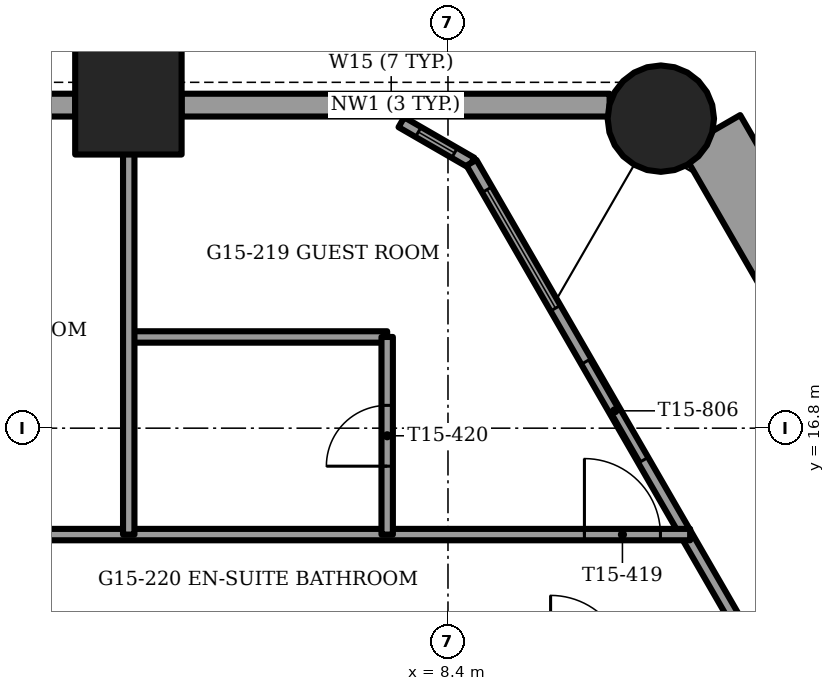
"""IFC4 building model, lengths in metres.
Left out: names, types, materials, properties, quantities, classifications, styles, units other than length and angle.
Written with IfcOpenShell. Run it as: python <this file> out.ifc"""

import sys

from ifc_helpers import new_model, si_unit, direction, frame, frame_2d, origin, origin_2d, place, context, subcontext, project, spatial, rectangle, circle, extrude, element, fill, save


model = new_model("IFC4")
c1 = context("Model", 3, precision=1e-05, world=origin(), true_north=direction((0.0, 1.0)))
c2 = subcontext(c1, "Body", "Model", "MODEL_VIEW")
j1 = project(units=[si_unit("LENGTHUNIT", "METRE"), si_unit("PLANEANGLEUNIT", "RADIAN")], contexts=[c1])
p1 = place(None, origin())
s1 = spatial("IfcSite", under=j1, at=p1, CompositionType="ELEMENT")
p2 = place(p1, origin())
s2 = spatial("IfcBuilding", under=s1, at=p2, CompositionType="ELEMENT")
p3 = place(p2, frame((0.0, 0.0, 61.75)))
s3 = spatial("IfcBuildingStorey", under=s2, at=p3, CompositionType="ELEMENT", Elevation=61.75)
p4 = place(p3, frame((11.2, 20.872, -1.2), z_axis=(0.0, 0.0, 1.0), x_axis=(1.0, 0.0, 0.0)))
e1 = element("IfcColumn", 1, at=p4, inside=s3, PredefinedType="COLUMN", context=c2, shape_type="SweptSolid", body=[
    extrude(circle(Radius=0.7, at=origin_2d()), origin(), (0.0, 0.0, 1.0), 3.75),
])
p5 = place(p3, frame((4.195, 21.1, -1.2), z_axis=(0.0, 0.0, 1.0), x_axis=(1.0, 0.0, 0.0)))
e2 = element("IfcColumn", 2, at=p5, inside=s3, PredefinedType="COLUMN", context=c2, shape_type="SweptSolid", body=[
    extrude(rectangle(XDim=1.4, YDim=1.4, at=origin_2d()), origin(), (0.0, 0.0, 1.0), 3.75),
])
p6 = place(p3, frame((15.419, 14.521, 0.0), z_axis=(0.0, 0.0, 1.0), x_axis=(-0.500013966327, 0.866017340172, 0.0)))
e3 = element("IfcWall", 3, at=p6, inside=s3, PredefinedType="PARAPET", context=c2, shape_type="SweptSolid", body=[
    extrude(rectangle(XDim=7.129, YDim=0.9, at=frame_2d((3.564, 0.0))), origin(), (0.0, 0.0, 1.0), 1.1),
])
p7 = place(p3, frame((10.526, 21.05, 0.0), z_axis=(0.0, 0.0, 1.0), x_axis=(-1.0, 0.0, 0.0)))
e4 = element("IfcWall", 4, at=p7, inside=s3, PredefinedType="SOLIDWALL", context=c2, shape_type="SweptSolid", body=[
    extrude(rectangle(XDim=5.631, YDim=0.3, at=frame_2d((2.815, 0.0))), origin(), (0.0, 0.0, 1.0), 2.55),
])
p8 = place(p7, frame((2.423, 0.0, 0.15)))
e5 = element("IfcOpeningElement", 5, at=p8, cuts=e4, PredefinedType="OPENING", context=c2, shape_type="SweptSolid", body=[
    extrude(rectangle(XDim=0.9, YDim=2.15, at=frame_2d((0.45, 1.075))), frame((0.0, 0.15, 0.0), z_axis=(0.0, -1.0, 0.0), x_axis=(1.0, 0.0, 0.0)), (0.0, 0.0, 1.0), 0.3),
])
p9 = place(p3, frame((3.495, 21.05, 0.0), z_axis=(0.0, 0.0, 1.0), x_axis=(-1.0, 0.0, 0.0)))
e6 = element("IfcWall", 6, at=p9, inside=s3, PredefinedType="SOLIDWALL", context=c2, shape_type="SweptSolid", body=[
    extrude(rectangle(XDim=6.991, YDim=0.3, at=frame_2d((3.495, 0.0))), origin(), (0.0, 0.0, 1.0), 2.55),
])
p10 = place(p9, frame((0.8, 0.0, 0.15)))
e7 = element("IfcOpeningElement", 7, at=p10, cuts=e6, PredefinedType="OPENING", context=c2, shape_type="SweptSolid", body=[
    extrude(rectangle(XDim=1.8, YDim=2.15, at=frame_2d((0.9, 1.075))), frame((0.0, 0.15, 0.0), z_axis=(0.0, -1.0, 0.0), x_axis=(1.0, 0.0, 0.0)), (0.0, 0.0, 1.0), 0.3),
])
p11 = place(p9, frame((4.295, 0.0, 0.15)))
e8 = element("IfcOpeningElement", 8, at=p11, cuts=e6, PredefinedType="OPENING", context=c2, shape_type="SweptSolid", body=[
    extrude(rectangle(XDim=1.8, YDim=2.15, at=frame_2d((0.9, 1.075))), frame((0.0, 0.15, 0.0), z_axis=(0.0, -1.0, 0.0), x_axis=(1.0, 0.0, 0.0)), (0.0, 0.0, 1.0), 0.3),
])
p12 = place(p3, frame((20.543, -0.204, 0.0), z_axis=(0.0, 0.0, 1.0), x_axis=(-0.500005515081, 0.866022219628, 0.0)))
e9 = element("IfcWall", 9, at=p12, inside=s3, PredefinedType="SOLIDWALL", context=c2, shape_type="SweptSolid", body=[
    extrude(rectangle(XDim=23.667, YDim=0.15, at=frame_2d((11.833, 0.0))), origin(), (0.0, 0.0, 1.0), 3.45),
])
p13 = place(p12, frame((6.548, 0.0, 0.15)))
e10 = element("IfcOpeningElement", 10, at=p13, cuts=e9, PredefinedType="OPENING", context=c2, shape_type="SweptSolid", body=[
    extrude(rectangle(XDim=1.5, YDim=2.85, at=frame_2d((0.75, 1.425))), frame((0.0, 0.075, 0.0), z_axis=(0.0, -1.0, 0.0), x_axis=(1.0, 0.0, 0.0)), (0.0, 0.0, 1.0), 0.15),
])
p14 = place(p12, frame((8.648, 0.0, 0.15)))
e11 = element("IfcOpeningElement", 11, at=p14, cuts=e9, PredefinedType="OPENING", context=c2, shape_type="SweptSolid", body=[
    extrude(rectangle(XDim=1.8, YDim=2.85, at=frame_2d((0.9, 1.425))), frame((0.0, 0.075, 0.0), z_axis=(0.0, -1.0, 0.0), x_axis=(1.0, 0.0, 0.0)), (0.0, 0.0, 1.0), 0.15),
])
p15 = place(p12, frame((10.748, 0.0, 0.15)))
e12 = element("IfcOpeningElement", 12, at=p15, cuts=e9, PredefinedType="OPENING", context=c2, shape_type="SweptSolid", body=[
    extrude(rectangle(XDim=1.5, YDim=2.85, at=frame_2d((0.75, 1.425))), frame((0.0, 0.075, 0.0), z_axis=(0.0, -1.0, 0.0), x_axis=(1.0, 0.0, 0.0)), (0.0, 0.0, 1.0), 0.15),
])
p16 = place(p12, frame((13.914, 0.0, 0.15)))
e13 = element("IfcOpeningElement", 13, at=p16, cuts=e9, PredefinedType="OPENING", context=c2, shape_type="SweptSolid", body=[
    extrude(rectangle(XDim=0.9, YDim=2.85, at=frame_2d((0.45, 1.425))), frame((0.0, 0.075, 0.0), z_axis=(0.0, -1.0, 0.0), x_axis=(1.0, 0.0, 0.0)), (0.0, 0.0, 1.0), 0.15),
])
p17 = place(p12, frame((14.948, 0.0, 0.15)))
e14 = element("IfcOpeningElement", 14, at=p17, cuts=e9, PredefinedType="OPENING", context=c2, shape_type="SweptSolid", body=[
    extrude(rectangle(XDim=1.5, YDim=2.85, at=frame_2d((0.75, 1.425))), frame((0.0, 0.075, 0.0), z_axis=(0.0, -1.0, 0.0), x_axis=(1.0, 0.0, 0.0)), (0.0, 0.0, 1.0), 0.15),
])
p18 = place(p12, frame((19.148, 0.0, 0.0)))
e15 = element("IfcOpeningElement", 15, at=p18, cuts=e9, PredefinedType="OPENING", context=c2, shape_type="SweptSolid", body=[
    extrude(rectangle(XDim=1.5, YDim=2.4, at=frame_2d((0.75, 1.2))), frame((0.0, 0.075, 0.0), z_axis=(0.0, -1.0, 0.0), x_axis=(1.0, 0.0, 0.0)), (0.0, 0.0, 1.0), 0.15),
])
p19 = place(p12, frame((1.617, 0.0, 0.15)))
e16 = element("IfcOpeningElement", 16, at=p19, cuts=e9, PredefinedType="OPENING", context=c2, shape_type="SweptSolid", body=[
    extrude(rectangle(XDim=1.8, YDim=2.73, at=frame_2d((0.9, 1.365))), frame((0.0, 0.075, 0.0), z_axis=(0.0, -1.0, 0.0), x_axis=(1.0, 0.0, 0.0)), (0.0, 0.0, 1.0), 0.15),
])
p20 = place(p12, frame((21.458, 0.0, 0.15)))
e17 = element("IfcOpeningElement", 17, at=p20, cuts=e9, PredefinedType="OPENING", context=c2, shape_type="SweptSolid", body=[
    extrude(rectangle(XDim=1.8, YDim=2.73, at=frame_2d((0.9, 1.365))), frame((0.0, 0.075, 0.0), z_axis=(0.0, -1.0, 0.0), x_axis=(1.0, 0.0, 0.0)), (0.0, 0.0, 1.0), 0.15),
])
p21 = place(p3, frame((8.709, 20.292, 0.0), z_axis=(0.0, 0.0, 1.0), x_axis=(-0.865990848561, 0.500059846627, 0.0)))
e18 = element("IfcWall", 18, at=p21, inside=s3, PredefinedType="SOLIDWALL", context=c2, shape_type="SweptSolid", body=[
    extrude(rectangle(XDim=1.065, YDim=0.15, at=frame_2d((0.532, 0.0))), origin(), (0.0, 0.0, 1.0), 3.45),
])
p22 = place(p21, frame((0.258, 0.0, 0.15)))
e19 = element("IfcOpeningElement", 19, at=p22, cuts=e18, PredefinedType="OPENING", context=c2, shape_type="SweptSolid", body=[
    extrude(rectangle(XDim=0.55, YDim=2.85, at=frame_2d((0.275, 1.425))), frame((0.0, 0.075, 0.0), z_axis=(0.0, -1.0, 0.0), x_axis=(1.0, 0.0, 0.0)), (0.0, 0.0, 1.0), 0.15),
])
p23 = place(p3, frame((-11.586, 15.4, 0.0), z_axis=(0.0, 0.0, 1.0), x_axis=(1.0, 0.0, 0.0)))
e20 = element("IfcWall", 20, at=p23, inside=s3, PredefinedType="PARTITIONING", context=c2, shape_type="SweptSolid", body=[
    extrude(rectangle(XDim=23.172, YDim=0.15, at=frame_2d((11.586, 0.0))), origin(), (0.0, 0.0, 1.0), 3.45),
])
p24 = place(p23, frame((1.164, 0.0, 0.0)))
e21 = element("IfcOpeningElement", 21, at=p24, cuts=e20, PredefinedType="OPENING", context=c2, shape_type="SweptSolid", body=[
    extrude(rectangle(XDim=1.0, YDim=2.1, at=frame_2d((0.5, 1.05))), frame((0.0, 0.075, 0.0), z_axis=(0.0, -1.0, 0.0), x_axis=(1.0, 0.0, 0.0)), (0.0, 0.0, 1.0), 0.15),
])
p25 = place(p23, frame((3.436, 0.0, 0.0)))
e22 = element("IfcOpeningElement", 22, at=p25, cuts=e20, PredefinedType="OPENING", context=c2, shape_type="SweptSolid", body=[
    extrude(rectangle(XDim=1.0, YDim=2.1, at=frame_2d((0.5, 1.05))), frame((0.0, 0.075, 0.0), z_axis=(0.0, -1.0, 0.0), x_axis=(1.0, 0.0, 0.0)), (0.0, 0.0, 1.0), 0.15),
])
p26 = place(p23, frame((13.186, 0.0, 0.0)))
e23 = element("IfcOpeningElement", 23, at=p26, cuts=e20, PredefinedType="OPENING", context=c2, shape_type="SweptSolid", body=[
    extrude(rectangle(XDim=1.0, YDim=2.1, at=frame_2d((0.5, 1.05))), frame((0.0, 0.075, 0.0), z_axis=(0.0, -1.0, 0.0), x_axis=(1.0, 0.0, 0.0)), (0.0, 0.0, 1.0), 0.15),
])
p27 = place(p23, frame((21.781, 0.0, 0.0)))
e24 = element("IfcOpeningElement", 24, at=p27, cuts=e20, PredefinedType="OPENING", context=c2, shape_type="SweptSolid", body=[
    extrude(rectangle(XDim=1.0, YDim=2.1, at=frame_2d((0.5, 1.05))), frame((0.0, 0.075, 0.0), z_axis=(0.0, -1.0, 0.0), x_axis=(1.0, 0.0, 0.0)), (0.0, 0.0, 1.0), 0.15),
])
p28 = place(p3, frame((4.2, 18.0, 0.0), z_axis=(0.0, 0.0, 1.0), x_axis=(1.0, 0.0, 0.0)))
e25 = element("IfcWall", 25, at=p28, inside=s3, PredefinedType="PARTITIONING", context=c2, shape_type="SweptSolid", body=[
    extrude(rectangle(XDim=3.4, YDim=0.15, at=frame_2d((1.7, 0.0))), origin(), (0.0, 0.0, 1.0), 3.45),
])
p29 = place(p3, frame((7.6, 15.4, 0.0), z_axis=(0.0, 0.0, 1.0), x_axis=(0.0, 1.0, 0.0)))
e26 = element("IfcWall", 26, at=p29, inside=s3, PredefinedType="PARTITIONING", context=c2, shape_type="SweptSolid", body=[
    extrude(rectangle(XDim=2.6, YDim=0.15, at=frame_2d((1.3, 0.0))), origin(), (0.0, 0.0, 1.0), 3.45),
])
p30 = place(p29, frame((0.9, 0.0, 0.0)))
e27 = element("IfcOpeningElement", 27, at=p30, cuts=e26, PredefinedType="OPENING", context=c2, shape_type="SweptSolid", body=[
    extrude(rectangle(XDim=0.8, YDim=2.1, at=frame_2d((0.4, 1.05))), frame((0.0, 0.075, 0.0), z_axis=(0.0, -1.0, 0.0), x_axis=(1.0, 0.0, 0.0)), (0.0, 0.0, 1.0), 0.15),
])
p31 = place(p3, frame((4.2, 15.4, 0.0), z_axis=(0.0, 0.0, 1.0), x_axis=(0.0, 1.0, 0.0)))
e28 = element("IfcWall", 28, at=p31, inside=s3, PredefinedType="PARTITIONING", context=c2, shape_type="SweptSolid", body=[
    extrude(rectangle(XDim=5.47, YDim=0.15, at=frame_2d((2.735, 0.0))), origin(), (0.0, 0.0, 1.0), 3.45),
])
p32 = place(p8, origin())
e29 = element("IfcWindow", 29, at=p32, inside=s3, PartitioningType="SINGLE_PANEL", PredefinedType="WINDOW", context=c2, shape_type="SweptSolid", body=[
    extrude(rectangle(XDim=0.9, YDim=2.15, at=frame_2d((0.45, 1.075))), frame((0.0, 0.03, 0.0), z_axis=(0.0, -1.0, 0.0), x_axis=(1.0, 0.0, 0.0)), (0.0, 0.0, 1.0), 0.06),
])
fill(e5, e29)
p33 = place(p18, origin())
e30 = element("IfcDoor", 30, at=p33, inside=s3, OperationType="SLIDING_TO_LEFT", PredefinedType="DOOR", context=c2, shape_type="SweptSolid", body=[
    extrude(rectangle(XDim=1.5, YDim=2.4, at=frame_2d((0.75, 1.2))), frame((0.0, 0.025, 0.0), z_axis=(0.0, -1.0, 0.0), x_axis=(1.0, 0.0, 0.0)), (0.0, 0.0, 1.0), 0.05),
])
fill(e15, e30)
p34 = place(p20, origin())
e31 = element("IfcWindow", 31, at=p34, inside=s3, PartitioningType="SINGLE_PANEL", PredefinedType="WINDOW", context=c2, shape_type="SweptSolid", body=[
    extrude(rectangle(XDim=1.8, YDim=2.73, at=frame_2d((0.9, 1.365))), frame((0.0, 0.03, 0.0), z_axis=(0.0, -1.0, 0.0), x_axis=(1.0, 0.0, 0.0)), (0.0, 0.0, 1.0), 0.06),
])
fill(e17, e31)
p35 = place(p22, origin())
e32 = element("IfcWindow", 32, at=p35, inside=s3, PartitioningType="SINGLE_PANEL", PredefinedType="WINDOW", context=c2, shape_type="SweptSolid", body=[
    extrude(rectangle(XDim=0.55, YDim=2.85, at=frame_2d((0.275, 1.425))), frame((0.0, 0.03, 0.0), z_axis=(0.0, -1.0, 0.0), x_axis=(1.0, 0.0, 0.0)), (0.0, 0.0, 1.0), 0.06),
])
fill(e19, e32)
p36 = place(p27, origin())
e33 = element("IfcDoor", 33, at=p36, inside=s3, OperationType="SINGLE_SWING_RIGHT", PredefinedType="DOOR", context=c2, shape_type="SweptSolid", body=[
    extrude(rectangle(XDim=1.0, YDim=2.1, at=frame_2d((0.5, 1.05))), frame((0.0, 0.025, 0.0), z_axis=(0.0, -1.0, 0.0), x_axis=(1.0, 0.0, 0.0)), (0.0, 0.0, 1.0), 0.05),
])
fill(e24, e33)
p37 = place(p30, origin())
e34 = element("IfcDoor", 34, at=p37, inside=s3, OperationType="SINGLE_SWING_LEFT", PredefinedType="DOOR", context=c2, shape_type="SweptSolid", body=[
    extrude(rectangle(XDim=0.8, YDim=2.1, at=frame_2d((0.4, 1.05))), frame((0.0, 0.025, 0.0), z_axis=(0.0, -1.0, 0.0), x_axis=(1.0, 0.0, 0.0)), (0.0, 0.0, 1.0), 0.05),
])
fill(e27, e34)
save(model, sys.argv[1])
